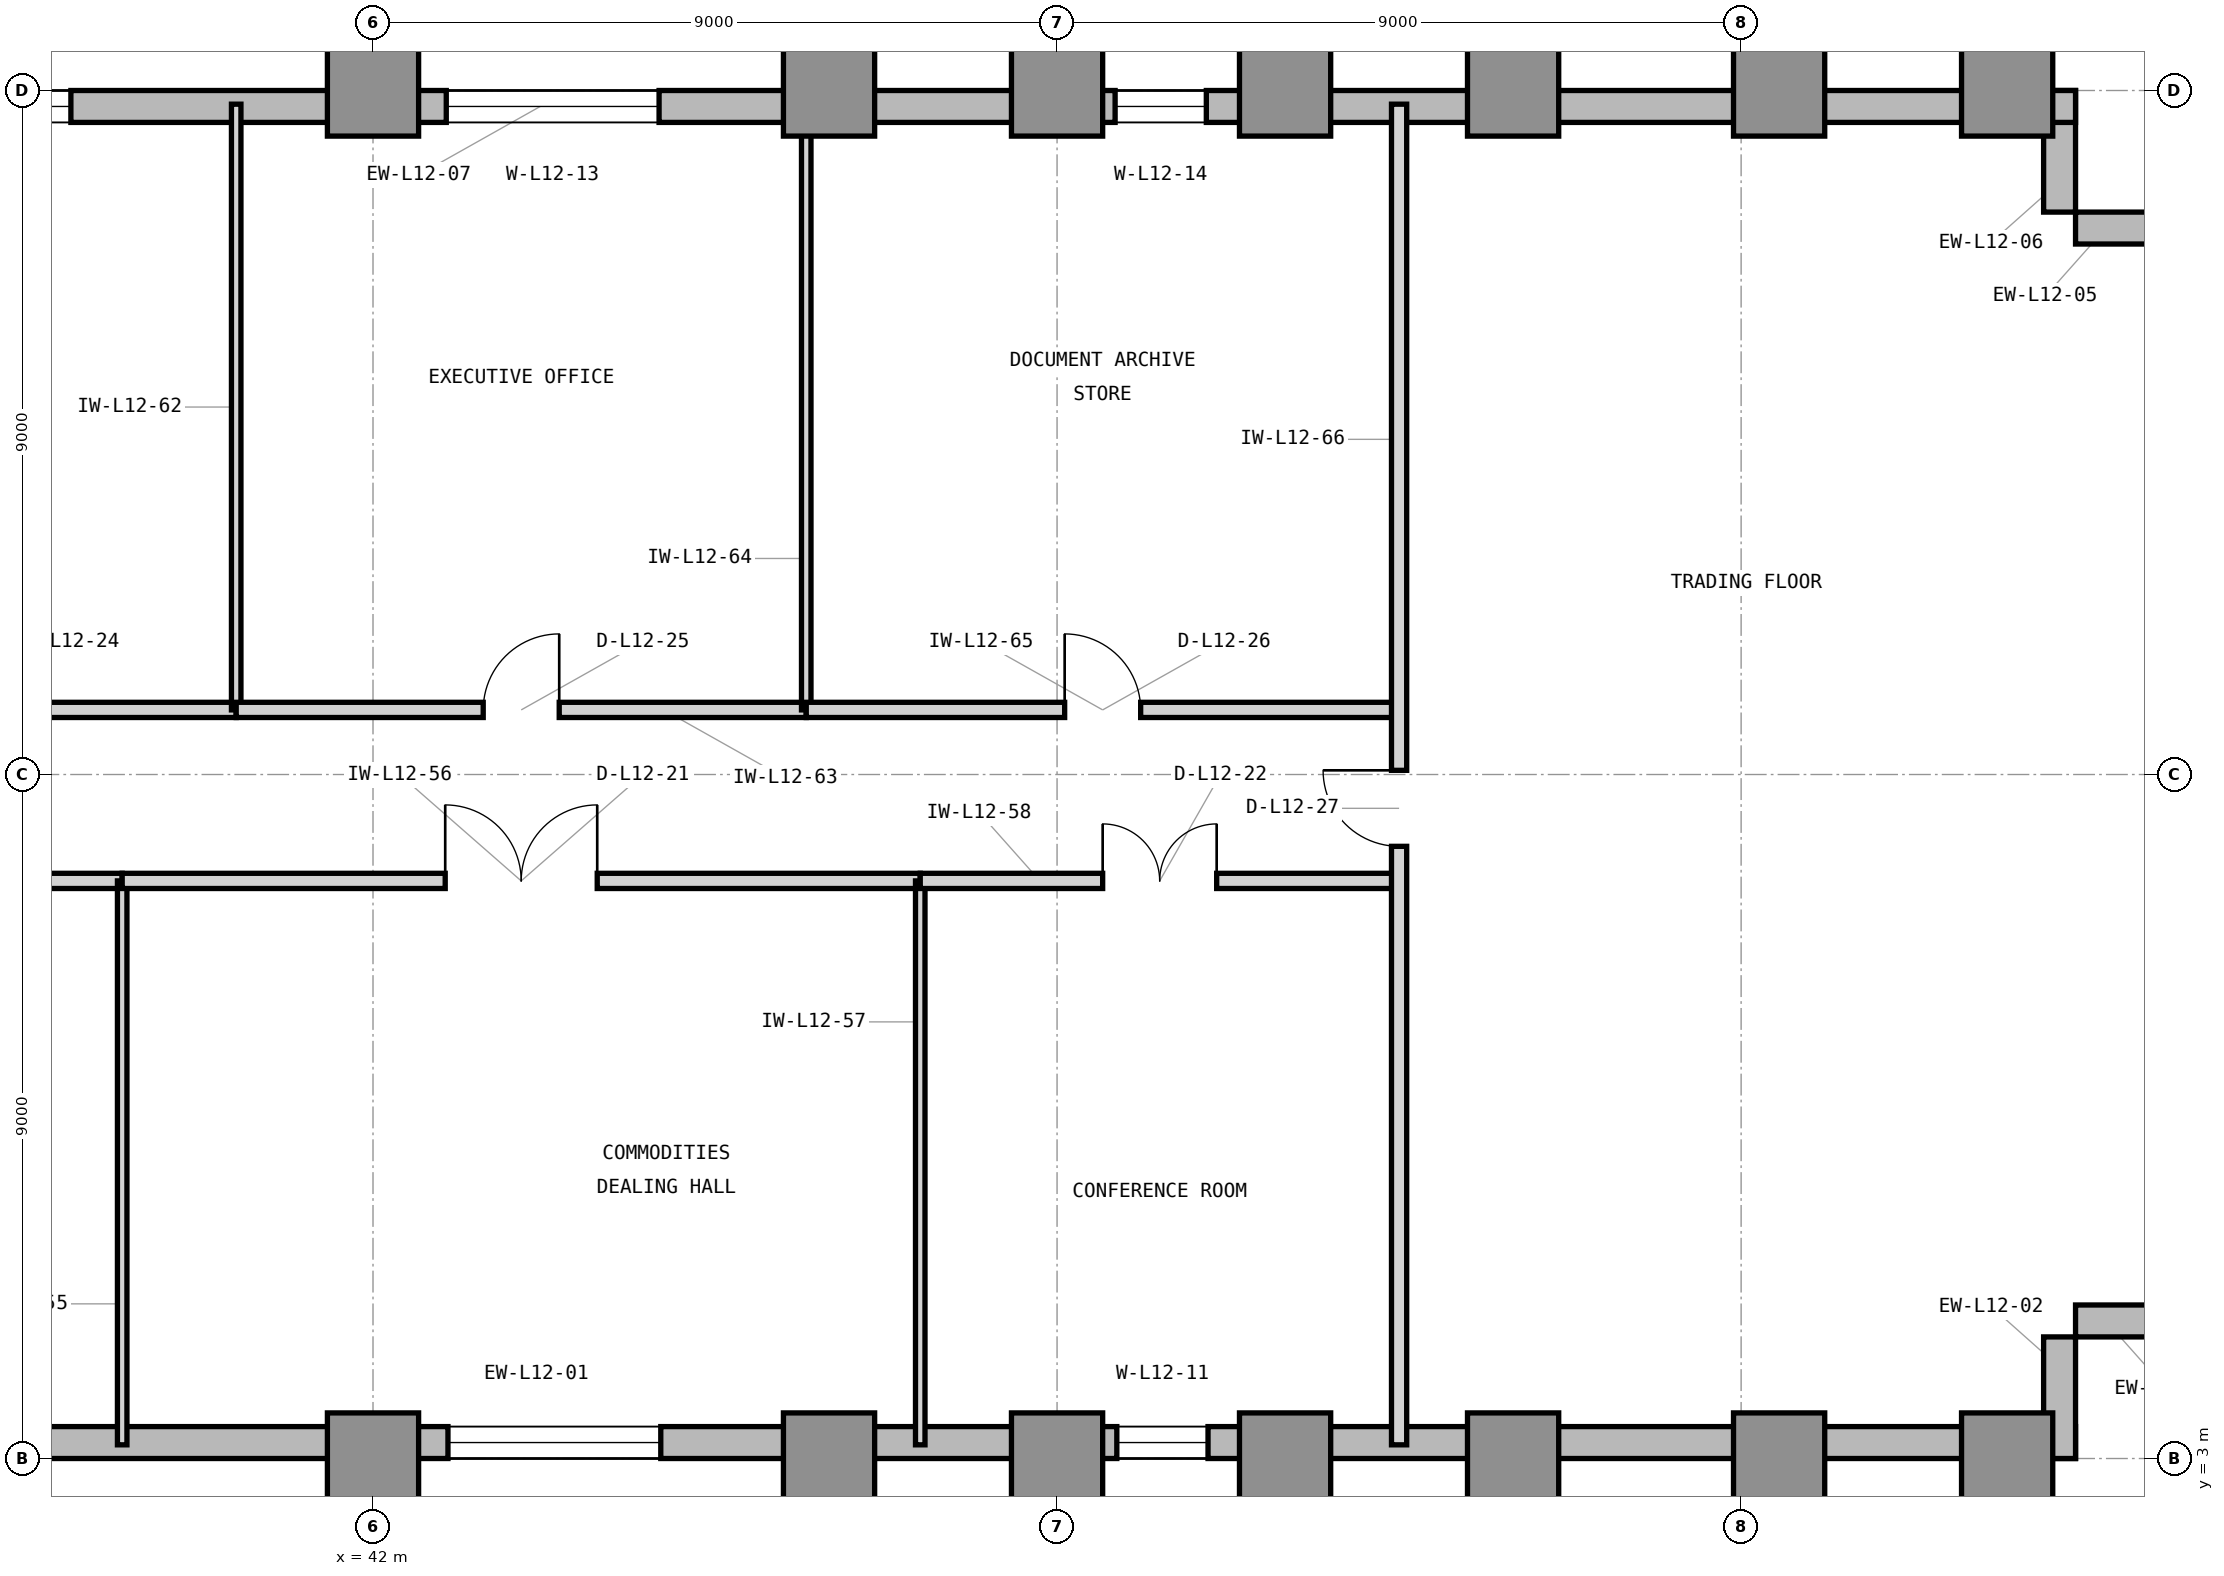
"""IFC4 building model, lengths in metres.
Left out: names, types, materials, properties, quantities, classifications, styles, units other than length and angle.
Written with IfcOpenShell. Run it as: python <this file> out.ifc"""

import sys

from ifc_helpers import new_model, si_unit, direction, frame, frame_2d, origin, origin_2d, place, context, subcontext, project, spatial, rectangle, extrude, element, fill, save


model = new_model("IFC4")
c1 = context("Model", 3, precision=1e-05, world=origin(), true_north=direction((0.0, 1.0)))
c2 = subcontext(c1, "Body", "Model", "MODEL_VIEW")
j1 = project(units=[si_unit("LENGTHUNIT", "METRE"), si_unit("PLANEANGLEUNIT", "RADIAN")], contexts=[c1])
p1 = place(None, origin())
s1 = spatial("IfcSite", under=j1, at=p1, CompositionType="ELEMENT")
p2 = place(p1, origin())
s2 = spatial("IfcBuilding", under=s1, at=p2, CompositionType="ELEMENT")
p3 = place(p2, frame((0.0, 0.0, 55.2)))
s3 = spatial("IfcBuildingStorey", under=s2, at=p3, CompositionType="ELEMENT", Elevation=55.2)
for number, where, z_axis, x_axis in (
    (1, (42.0, 3.0, 0.0), (0.0, 0.0, 1.0), (1.0, 0.0, 0.0)),
    (2, (42.0, 21.0, 0.0), (0.0, 0.0, 1.0), (1.0, 0.0, 0.0)),
    (3, (48.0, 3.0, 0.0), (0.0, 0.0, 1.0), (1.0, 0.0, 0.0)),
    (4, (48.0, 21.0, 0.0), (0.0, 0.0, 1.0), (1.0, 0.0, 0.0)),
    (5, (51.0, 3.0, 0.0), (0.0, 0.0, 1.0), (1.0, 0.0, 0.0)),
    (6, (51.0, 21.0, 0.0), (0.0, 0.0, 1.0), (1.0, 0.0, 0.0)),
    (7, (54.0, 3.0, 0.0), (0.0, 0.0, 1.0), (1.0, 0.0, 0.0)),
    (8, (54.0, 21.0, 0.0), (0.0, 0.0, 1.0), (1.0, 0.0, 0.0)),
    (9, (57.0, 3.0, 0.0), (0.0, 0.0, 1.0), (1.0, 0.0, 0.0)),
    (10, (57.0, 21.0, 0.0), (0.0, 0.0, 1.0), (1.0, 0.0, 0.0)),
    (11, (60.5, 3.0, 0.0), (0.0, 0.0, 1.0), (1.0, 0.0, 0.0)),
    (12, (60.5, 21.0, 0.0), (0.0, 0.0, 1.0), (1.0, 0.0, 0.0)),
    (13, (63.5, 3.0, 0.0), (0.0, 0.0, 1.0), (1.0, 0.0, 0.0)),
    (14, (63.5, 21.0, 0.0), (0.0, 0.0, 1.0), (1.0, 0.0, 0.0)),
):
    element("IfcColumn", number, at=place(p3, frame(where, z_axis=z_axis, x_axis=x_axis)), inside=s3, PredefinedType="COLUMN", context=c2, shape_type="SweptSolid", body=[
        extrude(rectangle(XDim=1.2, YDim=1.2, at=origin_2d()), origin(), (0.0, 0.0, 1.0), 4.2),
    ])
p4 = place(p3, frame((23.9, 3.21, 0.0), z_axis=(0.0, 0.0, 1.0), x_axis=(1.0, 0.0, 0.0)))
e15 = element("IfcWall", 15, at=p4, inside=s3, PredefinedType="STANDARD", context=c2, shape_type="SweptSolid", body=[
    extrude(rectangle(XDim=40.5, YDim=0.42, at=frame_2d((20.25, 0.0))), origin(), (0.0, 0.0, 1.0), 3.98),
])
p5 = place(p4, frame((1.1, 0.0, 0.85)))
e16 = element("IfcOpeningElement", 16, at=p5, cuts=e15, PredefinedType="OPENING", context=c2, shape_type="SweptSolid", body=[
    extrude(rectangle(XDim=1.2, YDim=2.45, at=frame_2d((0.6, 1.225))), frame((0.0, 0.22, 0.0), z_axis=(0.0, -1.0, 0.0), x_axis=(1.0, 0.0, 0.0)), (0.0, 0.0, 1.0), 0.44),
])
p6 = place(p4, frame((5.336, 0.0, 0.85)))
e17 = element("IfcOpeningElement", 17, at=p6, cuts=e15, PredefinedType="OPENING", context=c2, shape_type="SweptSolid", body=[
    extrude(rectangle(XDim=2.8, YDim=2.45, at=frame_2d((1.4, 1.225))), frame((0.0, 0.22, 0.0), z_axis=(0.0, -1.0, 0.0), x_axis=(1.0, 0.0, 0.0)), (0.0, 0.0, 1.0), 0.44),
])
p7 = place(p4, frame((19.086, 0.0, 0.85)))
e18 = element("IfcOpeningElement", 18, at=p7, cuts=e15, PredefinedType="OPENING", context=c2, shape_type="SweptSolid", body=[
    extrude(rectangle(XDim=2.8, YDim=2.45, at=frame_2d((1.4, 1.225))), frame((0.0, 0.22, 0.0), z_axis=(0.0, -1.0, 0.0), x_axis=(1.0, 0.0, 0.0)), (0.0, 0.0, 1.0), 0.44),
])
p8 = place(p4, frame((27.886, 0.0, 0.85)))
e19 = element("IfcOpeningElement", 19, at=p8, cuts=e15, PredefinedType="OPENING", context=c2, shape_type="SweptSolid", body=[
    extrude(rectangle(XDim=1.2, YDim=2.45, at=frame_2d((0.6, 1.225))), frame((0.0, 0.22, 0.0), z_axis=(0.0, -1.0, 0.0), x_axis=(1.0, 0.0, 0.0)), (0.0, 0.0, 1.0), 0.44),
])
for number, where, z_axis, x_axis in (
    (20, (64.19, 3.0, 0.0), (0.0, 0.0, 1.0), (0.0, 1.0, 0.0)),
    (21, (64.4, 4.81, 0.0), (0.0, 0.0, 1.0), (1.0, 0.0, 0.0)),
    (22, (66.0, 19.19, 0.0), (0.0, 0.0, 1.0), (-1.0, 0.0, 0.0)),
    (23, (64.19, 19.4, 0.0), (0.0, 0.0, 1.0), (0.0, 1.0, 0.0)),
):
    element("IfcWall", number, at=place(p3, frame(where, z_axis=z_axis, x_axis=x_axis)), inside=s3, PredefinedType="STANDARD", context=c2, shape_type="SweptSolid", body=[
        extrude(rectangle(XDim=1.6, YDim=0.42, at=frame_2d((0.8, 0.0))), origin(), (0.0, 0.0, 1.0), 3.98),
    ])
p9 = place(p3, frame((64.4, 20.79, 0.0), z_axis=(0.0, 0.0, 1.0), x_axis=(-1.0, 0.0, 0.0)))
e24 = element("IfcWall", 24, at=p9, inside=s3, PredefinedType="STANDARD", context=c2, shape_type="SweptSolid", body=[
    extrude(rectangle(XDim=40.4, YDim=0.42, at=frame_2d((20.2, 0.0))), origin(), (0.0, 0.0, 1.0), 3.98),
])
p10 = place(p9, frame((26.375, 0.0, 0.85)))
e25 = element("IfcOpeningElement", 25, at=p10, cuts=e24, PredefinedType="OPENING", context=c2, shape_type="SweptSolid", body=[
    extrude(rectangle(XDim=2.8, YDim=2.45, at=frame_2d((1.4, 1.225))), frame((0.0, 0.22, 0.0), z_axis=(0.0, -1.0, 0.0), x_axis=(1.0, 0.0, 0.0)), (0.0, 0.0, 1.0), 0.44),
])
p11 = place(p9, frame((38.222, 0.0, 0.85)))
e26 = element("IfcOpeningElement", 26, at=p11, cuts=e24, PredefinedType="OPENING", context=c2, shape_type="SweptSolid", body=[
    extrude(rectangle(XDim=1.2, YDim=2.45, at=frame_2d((0.6, 1.225))), frame((0.0, 0.22, 0.0), z_axis=(0.0, -1.0, 0.0), x_axis=(1.0, 0.0, 0.0)), (0.0, 0.0, 1.0), 0.44),
])
p12 = place(p9, frame((33.286, 0.0, 0.85)))
e27 = element("IfcOpeningElement", 27, at=p12, cuts=e24, PredefinedType="OPENING", context=c2, shape_type="SweptSolid", body=[
    extrude(rectangle(XDim=2.8, YDim=2.45, at=frame_2d((1.4, 1.225))), frame((0.0, 0.22, 0.0), z_axis=(0.0, -1.0, 0.0), x_axis=(1.0, 0.0, 0.0)), (0.0, 0.0, 1.0), 0.44),
])
p13 = place(p9, frame((18.636, 0.0, 0.85)))
e28 = element("IfcOpeningElement", 28, at=p13, cuts=e24, PredefinedType="OPENING", context=c2, shape_type="SweptSolid", body=[
    extrude(rectangle(XDim=2.8, YDim=2.45, at=frame_2d((1.4, 1.225))), frame((0.0, 0.22, 0.0), z_axis=(0.0, -1.0, 0.0), x_axis=(1.0, 0.0, 0.0)), (0.0, 0.0, 1.0), 0.44),
])
p14 = place(p9, frame((11.436, 0.0, 0.85)))
e29 = element("IfcOpeningElement", 29, at=p14, cuts=e24, PredefinedType="OPENING", context=c2, shape_type="SweptSolid", body=[
    extrude(rectangle(XDim=1.2, YDim=2.45, at=frame_2d((0.6, 1.225))), frame((0.0, 0.22, 0.0), z_axis=(0.0, -1.0, 0.0), x_axis=(1.0, 0.0, 0.0)), (0.0, 0.0, 1.0), 0.44),
])
p15 = place(p3, frame((26.7, 10.6, 0.0), z_axis=(0.0, 0.0, 1.0), x_axis=(1.0, 0.0, 0.0)))
e30 = element("IfcWall", 30, at=p15, inside=s3, PredefinedType="PARTITIONING", context=c2, shape_type="SweptSolid", body=[
    extrude(rectangle(XDim=12.0, YDim=0.2, at=frame_2d((6.0, 0.0))), origin(), (0.0, 0.0, 1.0), 3.97),
])
p16 = place(p15, frame((5.0, 0.0, 0.0)))
e31 = element("IfcOpeningElement", 31, at=p16, cuts=e30, PredefinedType="OPENING", context=c2, shape_type="SweptSolid", body=[
    extrude(rectangle(XDim=2.0, YDim=2.5, at=frame_2d((1.0, 1.25))), frame((0.0, 0.11, 0.0), z_axis=(0.0, -1.0, 0.0), x_axis=(1.0, 0.0, 0.0)), (0.0, 0.0, 1.0), 0.22),
])
p17 = place(p3, frame((38.7, 3.18, 0.0), z_axis=(0.0, 0.0, 1.0), x_axis=(0.0, 1.0, 0.0)))
e32 = element("IfcWall", 32, at=p17, inside=s3, PredefinedType="PARTITIONING", context=c2, shape_type="SweptSolid", body=[
    extrude(rectangle(XDim=7.42, YDim=0.125, at=frame_2d((3.71, 0.0))), origin(), (0.0, 0.0, 1.0), 3.97),
])
p18 = place(p3, frame((38.7, 10.6, 0.0), z_axis=(0.0, 0.0, 1.0), x_axis=(1.0, 0.0, 0.0)))
e33 = element("IfcWall", 33, at=p18, inside=s3, PredefinedType="PARTITIONING", context=c2, shape_type="SweptSolid", body=[
    extrude(rectangle(XDim=10.5, YDim=0.2, at=frame_2d((5.25, 0.0))), origin(), (0.0, 0.0, 1.0), 3.97),
])
p19 = place(p18, frame((4.25, 0.0, 0.0)))
e34 = element("IfcOpeningElement", 34, at=p19, cuts=e33, PredefinedType="OPENING", context=c2, shape_type="SweptSolid", body=[
    extrude(rectangle(XDim=2.0, YDim=2.5, at=frame_2d((1.0, 1.25))), frame((0.0, 0.11, 0.0), z_axis=(0.0, -1.0, 0.0), x_axis=(1.0, 0.0, 0.0)), (0.0, 0.0, 1.0), 0.22),
])
p20 = place(p3, frame((49.2, 3.18, 0.0), z_axis=(0.0, 0.0, 1.0), x_axis=(0.0, 1.0, 0.0)))
e35 = element("IfcWall", 35, at=p20, inside=s3, PredefinedType="PARTITIONING", context=c2, shape_type="SweptSolid", body=[
    extrude(rectangle(XDim=7.42, YDim=0.125, at=frame_2d((3.71, 0.0))), origin(), (0.0, 0.0, 1.0), 3.97),
])
p21 = place(p3, frame((49.2, 10.6, 0.0), z_axis=(0.0, 0.0, 1.0), x_axis=(1.0, 0.0, 0.0)))
e36 = element("IfcWall", 36, at=p21, inside=s3, PredefinedType="PARTITIONING", context=c2, shape_type="SweptSolid", body=[
    extrude(rectangle(XDim=6.3, YDim=0.2, at=frame_2d((3.15, 0.0))), origin(), (0.0, 0.0, 1.0), 3.97),
])
p22 = place(p21, frame((2.4, 0.0, 0.0)))
e37 = element("IfcOpeningElement", 37, at=p22, cuts=e36, PredefinedType="OPENING", context=c2, shape_type="SweptSolid", body=[
    extrude(rectangle(XDim=1.5, YDim=2.3, at=frame_2d((0.75, 1.15))), frame((0.0, 0.11, 0.0), z_axis=(0.0, -1.0, 0.0), x_axis=(1.0, 0.0, 0.0)), (0.0, 0.0, 1.0), 0.22),
])
p23 = place(p3, frame((32.7, 12.85, 0.0), z_axis=(0.0, 0.0, 1.0), x_axis=(1.0, 0.0, 0.0)))
e38 = element("IfcWall", 38, at=p23, inside=s3, PredefinedType="PARTITIONING", context=c2, shape_type="SweptSolid", body=[
    extrude(rectangle(XDim=7.5, YDim=0.2, at=frame_2d((3.75, 0.0))), origin(), (0.0, 0.0, 1.0), 3.97),
])
p24 = place(p23, frame((3.25, 0.0, 0.0)))
e39 = element("IfcOpeningElement", 39, at=p24, cuts=e38, PredefinedType="OPENING", context=c2, shape_type="SweptSolid", body=[
    extrude(rectangle(XDim=1.0, YDim=2.15, at=frame_2d((0.5, 1.075))), frame((0.0, 0.11, 0.0), z_axis=(0.0, -1.0, 0.0), x_axis=(1.0, 0.0, 0.0)), (0.0, 0.0, 1.0), 0.22),
])
p25 = place(p3, frame((40.2, 12.85, 0.0), z_axis=(0.0, 0.0, 1.0), x_axis=(0.0, 1.0, 0.0)))
e40 = element("IfcWall", 40, at=p25, inside=s3, PredefinedType="PARTITIONING", context=c2, shape_type="SweptSolid", body=[
    extrude(rectangle(XDim=7.97, YDim=0.125, at=frame_2d((3.985, 0.0))), origin(), (0.0, 0.0, 1.0), 3.97),
])
p26 = place(p3, frame((40.2, 12.85, 0.0), z_axis=(0.0, 0.0, 1.0), x_axis=(1.0, 0.0, 0.0)))
e41 = element("IfcWall", 41, at=p26, inside=s3, PredefinedType="PARTITIONING", context=c2, shape_type="SweptSolid", body=[
    extrude(rectangle(XDim=7.5, YDim=0.2, at=frame_2d((3.75, 0.0))), origin(), (0.0, 0.0, 1.0), 3.97),
])
p27 = place(p26, frame((3.25, 0.0, 0.0)))
e42 = element("IfcOpeningElement", 42, at=p27, cuts=e41, PredefinedType="OPENING", context=c2, shape_type="SweptSolid", body=[
    extrude(rectangle(XDim=1.0, YDim=2.15, at=frame_2d((0.5, 1.075))), frame((0.0, 0.11, 0.0), z_axis=(0.0, -1.0, 0.0), x_axis=(1.0, 0.0, 0.0)), (0.0, 0.0, 1.0), 0.22),
])
p28 = place(p3, frame((47.7, 12.85, 0.0), z_axis=(0.0, 0.0, 1.0), x_axis=(0.0, 1.0, 0.0)))
e43 = element("IfcWall", 43, at=p28, inside=s3, PredefinedType="PARTITIONING", context=c2, shape_type="SweptSolid", body=[
    extrude(rectangle(XDim=7.97, YDim=0.125, at=frame_2d((3.985, 0.0))), origin(), (0.0, 0.0, 1.0), 3.97),
])
p29 = place(p3, frame((47.7, 12.85, 0.0), z_axis=(0.0, 0.0, 1.0), x_axis=(1.0, 0.0, 0.0)))
e44 = element("IfcWall", 44, at=p29, inside=s3, PredefinedType="PARTITIONING", context=c2, shape_type="SweptSolid", body=[
    extrude(rectangle(XDim=7.8, YDim=0.2, at=frame_2d((3.9, 0.0))), origin(), (0.0, 0.0, 1.0), 3.97),
])
p30 = place(p29, frame((3.4, 0.0, 0.0)))
e45 = element("IfcOpeningElement", 45, at=p30, cuts=e44, PredefinedType="OPENING", context=c2, shape_type="SweptSolid", body=[
    extrude(rectangle(XDim=1.0, YDim=2.15, at=frame_2d((0.5, 1.075))), frame((0.0, 0.11, 0.0), z_axis=(0.0, -1.0, 0.0), x_axis=(1.0, 0.0, 0.0)), (0.0, 0.0, 1.0), 0.22),
])
p31 = place(p3, frame((55.5, 3.18, 0.0), z_axis=(0.0, 0.0, 1.0), x_axis=(0.0, 1.0, 0.0)))
e46 = element("IfcWall", 46, at=p31, inside=s3, PredefinedType="PARTITIONING", context=c2, shape_type="SweptSolid", body=[
    extrude(rectangle(XDim=17.64, YDim=0.2, at=frame_2d((8.82, 0.0))), origin(), (0.0, 0.0, 1.0), 3.97),
])
p32 = place(p31, frame((7.875, 0.0, 0.0)))
e47 = element("IfcOpeningElement", 47, at=p32, cuts=e46, PredefinedType="OPENING", context=c2, shape_type="SweptSolid", body=[
    extrude(rectangle(XDim=1.0, YDim=2.15, at=frame_2d((0.5, 1.075))), frame((0.0, 0.11, 0.0), z_axis=(0.0, -1.0, 0.0), x_axis=(1.0, 0.0, 0.0)), (0.0, 0.0, 1.0), 0.22),
])
p33 = place(p10, origin())
e48 = element("IfcWindow", 48, at=p33, inside=s3, PartitioningType="SINGLE_PANEL", PredefinedType="WINDOW", context=c2, shape_type="SweptSolid", body=[
    extrude(rectangle(XDim=2.8, YDim=2.45, at=frame_2d((1.4, 1.225))), frame((0.0, 0.11, 0.0), z_axis=(0.0, -1.0, 0.0), x_axis=(1.0, 0.0, 0.0)), (0.0, 0.0, 1.0), 0.06),
])
fill(e25, e48)
p34 = place(p19, origin())
e49 = element("IfcDoor", 49, at=p34, inside=s3, OperationType="DOUBLE_DOOR_SINGLE_SWING", PredefinedType="DOOR", context=c2, shape_type="SweptSolid", body=[
    extrude(rectangle(XDim=2.0, YDim=2.5, at=frame_2d((1.0, 1.25))), frame((0.0, 0.025, 0.0), z_axis=(0.0, -1.0, 0.0), x_axis=(1.0, 0.0, 0.0)), (0.0, 0.0, 1.0), 0.05),
])
fill(e34, e49)
p35 = place(p22, origin())
e50 = element("IfcDoor", 50, at=p35, inside=s3, OperationType="DOUBLE_DOOR_SINGLE_SWING", PredefinedType="DOOR", context=c2, shape_type="SweptSolid", body=[
    extrude(rectangle(XDim=1.5, YDim=2.3, at=frame_2d((0.75, 1.15))), frame((0.0, 0.025, 0.0), z_axis=(0.0, -1.0, 0.0), x_axis=(1.0, 0.0, 0.0)), (0.0, 0.0, 1.0), 0.05),
])
fill(e37, e50)
p36 = place(p27, origin())
e51 = element("IfcDoor", 51, at=p36, inside=s3, OperationType="SINGLE_SWING_RIGHT", PredefinedType="DOOR", context=c2, shape_type="SweptSolid", body=[
    extrude(rectangle(XDim=1.0, YDim=2.15, at=frame_2d((0.5, 1.075))), frame((0.0, 0.025, 0.0), z_axis=(0.0, -1.0, 0.0), x_axis=(1.0, 0.0, 0.0)), (0.0, 0.0, 1.0), 0.05),
])
fill(e42, e51)
p37 = place(p30, origin())
e52 = element("IfcDoor", 52, at=p37, inside=s3, OperationType="SINGLE_SWING_LEFT", PredefinedType="DOOR", context=c2, shape_type="SweptSolid", body=[
    extrude(rectangle(XDim=1.0, YDim=2.15, at=frame_2d((0.5, 1.075))), frame((0.0, 0.025, 0.0), z_axis=(0.0, -1.0, 0.0), x_axis=(1.0, 0.0, 0.0)), (0.0, 0.0, 1.0), 0.05),
])
fill(e45, e52)
p38 = place(p32, origin())
e53 = element("IfcDoor", 53, at=p38, inside=s3, OperationType="SINGLE_SWING_RIGHT", PredefinedType="DOOR", context=c2, shape_type="SweptSolid", body=[
    extrude(rectangle(XDim=1.0, YDim=2.15, at=frame_2d((0.5, 1.075))), frame((0.0, 0.025, 0.0), z_axis=(0.0, -1.0, 0.0), x_axis=(1.0, 0.0, 0.0)), (0.0, 0.0, 1.0), 0.05),
])
fill(e47, e53)
p39 = place(p7, origin())
e54 = element("IfcWindow", 54, at=p39, inside=s3, PartitioningType="SINGLE_PANEL", PredefinedType="WINDOW", context=c2, shape_type="SweptSolid", body=[
    extrude(rectangle(XDim=2.8, YDim=2.45, at=frame_2d((1.4, 1.225))), frame((0.0, 0.11, 0.0), z_axis=(0.0, -1.0, 0.0), x_axis=(1.0, 0.0, 0.0)), (0.0, 0.0, 1.0), 0.06),
])
fill(e18, e54)
p40 = place(p8, origin())
e55 = element("IfcWindow", 55, at=p40, inside=s3, PartitioningType="SINGLE_PANEL", PredefinedType="WINDOW", context=c2, shape_type="SweptSolid", body=[
    extrude(rectangle(XDim=1.2, YDim=2.45, at=frame_2d((0.6, 1.225))), frame((0.0, 0.11, 0.0), z_axis=(0.0, -1.0, 0.0), x_axis=(1.0, 0.0, 0.0)), (0.0, 0.0, 1.0), 0.06),
])
fill(e19, e55)
p41 = place(p13, origin())
e56 = element("IfcWindow", 56, at=p41, inside=s3, PartitioningType="SINGLE_PANEL", PredefinedType="WINDOW", context=c2, shape_type="SweptSolid", body=[
    extrude(rectangle(XDim=2.8, YDim=2.45, at=frame_2d((1.4, 1.225))), frame((0.0, 0.11, 0.0), z_axis=(0.0, -1.0, 0.0), x_axis=(1.0, 0.0, 0.0)), (0.0, 0.0, 1.0), 0.06),
])
fill(e28, e56)
p42 = place(p14, origin())
e57 = element("IfcWindow", 57, at=p42, inside=s3, PartitioningType="SINGLE_PANEL", PredefinedType="WINDOW", context=c2, shape_type="SweptSolid", body=[
    extrude(rectangle(XDim=1.2, YDim=2.45, at=frame_2d((0.6, 1.225))), frame((0.0, 0.11, 0.0), z_axis=(0.0, -1.0, 0.0), x_axis=(1.0, 0.0, 0.0)), (0.0, 0.0, 1.0), 0.06),
])
fill(e29, e57)
save(model, sys.argv[1])
